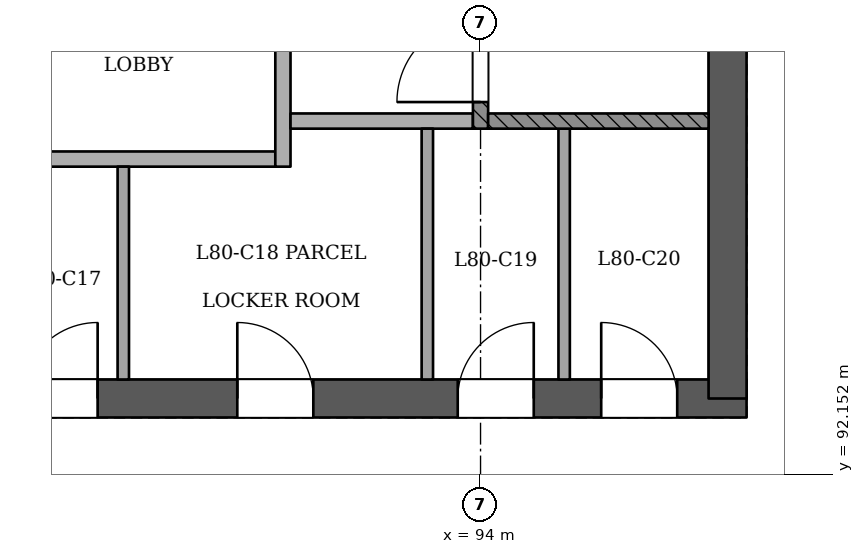
"""IFC4 building model, lengths in metres.
Left out: names, types, materials, properties, quantities, classifications, styles, units other than length and angle.
Written with IfcOpenShell. Run it as: python <this file> out.ifc"""

import sys

from ifc_helpers import new_model, si_unit, direction, frame, frame_2d, origin, place, context, subcontext, project, spatial, rectangle, extrude, element, fill, save


model = new_model("IFC4")
c1 = context("Model", 3, precision=1e-05, world=origin(), true_north=direction((0.0, 1.0)))
c2 = subcontext(c1, "Body", "Model", "MODEL_VIEW")
j1 = project(units=[si_unit("LENGTHUNIT", "METRE"), si_unit("PLANEANGLEUNIT", "RADIAN")], contexts=[c1])
p1 = place(None, origin())
s1 = spatial("IfcSite", under=j1, at=p1, CompositionType="ELEMENT")
p2 = place(p1, origin())
s2 = spatial("IfcBuilding", under=s1, at=p2, CompositionType="ELEMENT")
p3 = place(p2, frame((0.0, 0.0, 309.4)))
s3 = spatial("IfcBuildingStorey", under=s2, at=p3, CompositionType="ELEMENT", Elevation=309.4)
p4 = place(p3, frame((72.75, 93.15, 0.0), z_axis=(0.0, 0.0, 1.0), x_axis=(1.0, 0.0, 0.0)))
e1 = element("IfcWall", 1, at=p4, inside=s3, PredefinedType="SHEAR", context=c2, shape_type="SweptSolid", body=[
    extrude(rectangle(XDim=24.75, YDim=0.5, at=frame_2d((12.375, 0.0))), origin(), (0.0, 0.0, 1.0), 3.6),
])
p5 = place(p4, frame((1.05, 0.0, 0.0)))
e2 = element("IfcOpeningElement", 2, at=p5, cuts=e1, PredefinedType="OPENING", context=c2, shape_type="SweptSolid", body=[
    extrude(rectangle(XDim=1.2, YDim=2.1, at=frame_2d((0.6, 1.05))), frame((0.0, 0.26, 0.0), z_axis=(0.0, -1.0, 0.0), x_axis=(1.0, 0.0, 0.0)), (0.0, 0.0, 1.0), 0.521),
])
p6 = place(p4, frame((3.25, 0.0, 0.0)))
e3 = element("IfcOpeningElement", 3, at=p6, cuts=e1, PredefinedType="OPENING", context=c2, shape_type="SweptSolid", body=[
    extrude(rectangle(XDim=1.2, YDim=2.1, at=frame_2d((0.6, 1.05))), frame((0.0, 0.26, 0.0), z_axis=(0.0, -1.0, 0.0), x_axis=(1.0, 0.0, 0.0)), (0.0, 0.0, 1.0), 0.521),
])
p7 = place(p4, frame((13.25, 0.0, 0.0)))
e4 = element("IfcOpeningElement", 4, at=p7, cuts=e1, PredefinedType="OPENING", context=c2, shape_type="SweptSolid", body=[
    extrude(rectangle(XDim=1.2, YDim=2.1, at=frame_2d((0.6, 1.05))), frame((0.0, 0.26, 0.0), z_axis=(0.0, -1.0, 0.0), x_axis=(1.0, 0.0, 0.0)), (0.0, 0.0, 1.0), 0.521),
])
p8 = place(p4, frame((15.212, 0.0, 0.0)))
e5 = element("IfcOpeningElement", 5, at=p8, cuts=e1, PredefinedType="OPENING", context=c2, shape_type="SweptSolid", body=[
    extrude(rectangle(XDim=1.0, YDim=2.1, at=frame_2d((0.5, 1.05))), frame((0.0, 0.26, 0.0), z_axis=(0.0, -1.0, 0.0), x_axis=(1.0, 0.0, 0.0)), (0.0, 0.0, 1.0), 0.521),
])
p9 = place(p4, frame((18.05, 0.0, 0.0)))
e6 = element("IfcOpeningElement", 6, at=p9, cuts=e1, PredefinedType="OPENING", context=c2, shape_type="SweptSolid", body=[
    extrude(rectangle(XDim=1.0, YDim=2.1, at=frame_2d((0.5, 1.05))), frame((0.0, 0.26, 0.0), z_axis=(0.0, -1.0, 0.0), x_axis=(1.0, 0.0, 0.0)), (0.0, 0.0, 1.0), 0.521),
])
p10 = place(p4, frame((20.95, 0.0, 0.0)))
e7 = element("IfcOpeningElement", 7, at=p10, cuts=e1, PredefinedType="OPENING", context=c2, shape_type="SweptSolid", body=[
    extrude(rectangle(XDim=1.0, YDim=2.1, at=frame_2d((0.5, 1.05))), frame((0.0, 0.26, 0.0), z_axis=(0.0, -1.0, 0.0), x_axis=(1.0, 0.0, 0.0)), (0.0, 0.0, 1.0), 0.521),
])
p11 = place(p4, frame((22.837, 0.0, 0.0)))
e8 = element("IfcOpeningElement", 8, at=p11, cuts=e1, PredefinedType="OPENING", context=c2, shape_type="SweptSolid", body=[
    extrude(rectangle(XDim=1.0, YDim=2.1, at=frame_2d((0.5, 1.05))), frame((0.0, 0.26, 0.0), z_axis=(0.0, -1.0, 0.0), x_axis=(1.0, 0.0, 0.0)), (0.0, 0.0, 1.0), 0.521),
])
p12 = place(p3, frame((97.25, 93.15, 0.0), z_axis=(0.0, 0.0, 1.0), x_axis=(0.0, 1.0, 0.0)))
e9 = element("IfcWall", 9, at=p12, inside=s3, PredefinedType="SHEAR", context=c2, shape_type="SweptSolid", body=[
    extrude(rectangle(XDim=10.75, YDim=0.5, at=frame_2d((5.375, 0.0))), origin(), (0.0, 0.0, 1.0), 3.6),
])
p13 = place(p3, frame((89.3, 93.4, 0.0), z_axis=(0.0, 0.0, 1.0), x_axis=(0.0, 1.0, 0.0)))
e10 = element("IfcWall", 10, at=p13, inside=s3, PredefinedType="PARTITIONING", context=c2, shape_type="SweptSolid", body=[
    extrude(rectangle(XDim=2.8, YDim=0.15, at=frame_2d((1.4, 0.0))), origin(), (0.0, 0.0, 1.0), 3.2),
])
for number, where, z_axis, x_axis in (
    (11, (93.3, 93.4, 0.0), (0.0, 0.0, 1.0), (0.0, 1.0, 0.0)),
    (12, (95.1, 93.4, 0.0), (0.0, 0.0, 1.0), (0.0, 1.0, 0.0)),
):
    element("IfcWall", number, at=place(p3, frame(where, z_axis=z_axis, x_axis=x_axis)), inside=s3, PredefinedType="PARTITIONING", context=c2, shape_type="SweptSolid", body=[
        extrude(rectangle(XDim=3.3, YDim=0.15, at=frame_2d((1.65, 0.0))), origin(), (0.0, 0.0, 1.0), 3.2),
    ])
p14 = place(p3, frame((87.7, 96.3, 0.0), z_axis=(0.0, 0.0, 1.0), x_axis=(1.0, 0.0, 0.0)))
e13 = element("IfcWall", 13, at=p14, inside=s3, PredefinedType="PARTITIONING", context=c2, shape_type="SweptSolid", body=[
    extrude(rectangle(XDim=3.6, YDim=0.2, at=frame_2d((1.8, 0.0))), origin(), (0.0, 0.0, 1.0), 3.2),
])
p15 = place(p3, frame((91.4, 96.2, 0.0), z_axis=(0.0, 0.0, 1.0), x_axis=(0.0, 1.0, 0.0)))
e14 = element("IfcWall", 14, at=p15, inside=s3, PredefinedType="PARTITIONING", context=c2, shape_type="SweptSolid", body=[
    extrude(rectangle(XDim=4.2, YDim=0.2, at=frame_2d((2.1, 0.0))), origin(), (0.0, 0.0, 1.0), 3.2),
])
p16 = place(p15, frame((2.45, 0.0, 0.0)))
e15 = element("IfcOpeningElement", 15, at=p16, cuts=e14, PredefinedType="OPENING", context=c2, shape_type="SweptSolid", body=[
    extrude(rectangle(XDim=1.1, YDim=2.1, at=frame_2d((0.55, 1.05))), frame((0.0, 0.11, 0.0), z_axis=(0.0, -1.0, 0.0), x_axis=(1.0, 0.0, 0.0)), (0.0, 0.0, 1.0), 0.221),
])
p17 = place(p3, frame((91.5, 96.8, 0.0), z_axis=(0.0, 0.0, 1.0), x_axis=(1.0, 0.0, 0.0)))
e16 = element("IfcWall", 16, at=p17, inside=s3, PredefinedType="PARTITIONING", context=c2, shape_type="SweptSolid", body=[
    extrude(rectangle(XDim=2.4, YDim=0.2, at=frame_2d((1.2, 0.0))), origin(), (0.0, 0.0, 1.0), 3.2),
])
p18 = place(p3, frame((94.0, 96.7, 0.0), z_axis=(0.0, 0.0, 1.0), x_axis=(0.0, 1.0, 0.0)))
e17 = element("IfcWall", 17, at=p18, inside=s3, PredefinedType="SOLIDWALL", context=c2, shape_type="SweptSolid", body=[
    extrude(rectangle(XDim=3.7, YDim=0.2, at=frame_2d((1.85, 0.0))), origin(), (0.0, 0.0, 1.0), 3.2),
])
p19 = place(p18, frame((0.35, 0.0, 0.0)))
e18 = element("IfcOpeningElement", 18, at=p19, cuts=e17, PredefinedType="OPENING", context=c2, shape_type="SweptSolid", body=[
    extrude(rectangle(XDim=1.1, YDim=2.1, at=frame_2d((0.55, 1.05))), frame((0.0, 0.11, 0.0), z_axis=(0.0, -1.0, 0.0), x_axis=(1.0, 0.0, 0.0)), (0.0, 0.0, 1.0), 0.221),
])
p20 = place(p3, frame((94.1, 96.8, 0.0), z_axis=(0.0, 0.0, 1.0), x_axis=(1.0, 0.0, 0.0)))
e19 = element("IfcWall", 19, at=p20, inside=s3, PredefinedType="SOLIDWALL", context=c2, shape_type="SweptSolid", body=[
    extrude(rectangle(XDim=2.9, YDim=0.2, at=frame_2d((1.45, 0.0))), origin(), (0.0, 0.0, 1.0), 3.2),
])
p21 = place(p19, origin())
e20 = element("IfcDoor", 20, at=p21, inside=s3, OperationType="SINGLE_SWING_LEFT", PredefinedType="NOTDEFINED", context=c2, shape_type="SweptSolid", body=[
    extrude(rectangle(XDim=1.1, YDim=2.1, at=frame_2d((0.55, 1.05))), frame((0.0, 0.025, 0.0), z_axis=(0.0, -1.0, 0.0), x_axis=(1.0, 0.0, 0.0)), (0.0, 0.0, 1.0), 0.05),
])
fill(e18, e20)
p22 = place(p8, origin())
e21 = element("IfcDoor", 21, at=p22, inside=s3, OperationType="SINGLE_SWING_RIGHT", PredefinedType="NOTDEFINED", context=c2, shape_type="SweptSolid", body=[
    extrude(rectangle(XDim=1.0, YDim=2.1, at=frame_2d((0.5, 1.05))), frame((0.0, 0.025, 0.0), z_axis=(0.0, -1.0, 0.0), x_axis=(1.0, 0.0, 0.0)), (0.0, 0.0, 1.0), 0.05),
])
fill(e5, e21)
p23 = place(p9, origin())
e22 = element("IfcDoor", 22, at=p23, inside=s3, OperationType="SINGLE_SWING_LEFT", PredefinedType="NOTDEFINED", context=c2, shape_type="SweptSolid", body=[
    extrude(rectangle(XDim=1.0, YDim=2.1, at=frame_2d((0.5, 1.05))), frame((0.0, 0.025, 0.0), z_axis=(0.0, -1.0, 0.0), x_axis=(1.0, 0.0, 0.0)), (0.0, 0.0, 1.0), 0.05),
])
fill(e6, e22)
p24 = place(p10, origin())
e23 = element("IfcDoor", 23, at=p24, inside=s3, OperationType="SINGLE_SWING_RIGHT", PredefinedType="NOTDEFINED", context=c2, shape_type="SweptSolid", body=[
    extrude(rectangle(XDim=1.0, YDim=2.1, at=frame_2d((0.5, 1.05))), frame((0.0, 0.025, 0.0), z_axis=(0.0, -1.0, 0.0), x_axis=(1.0, 0.0, 0.0)), (0.0, 0.0, 1.0), 0.05),
])
fill(e7, e23)
p25 = place(p11, origin())
e24 = element("IfcDoor", 24, at=p25, inside=s3, OperationType="SINGLE_SWING_LEFT", PredefinedType="NOTDEFINED", context=c2, shape_type="SweptSolid", body=[
    extrude(rectangle(XDim=1.0, YDim=2.1, at=frame_2d((0.5, 1.05))), frame((0.0, 0.025, 0.0), z_axis=(0.0, -1.0, 0.0), x_axis=(1.0, 0.0, 0.0)), (0.0, 0.0, 1.0), 0.05),
])
fill(e8, e24)
save(model, sys.argv[1])
